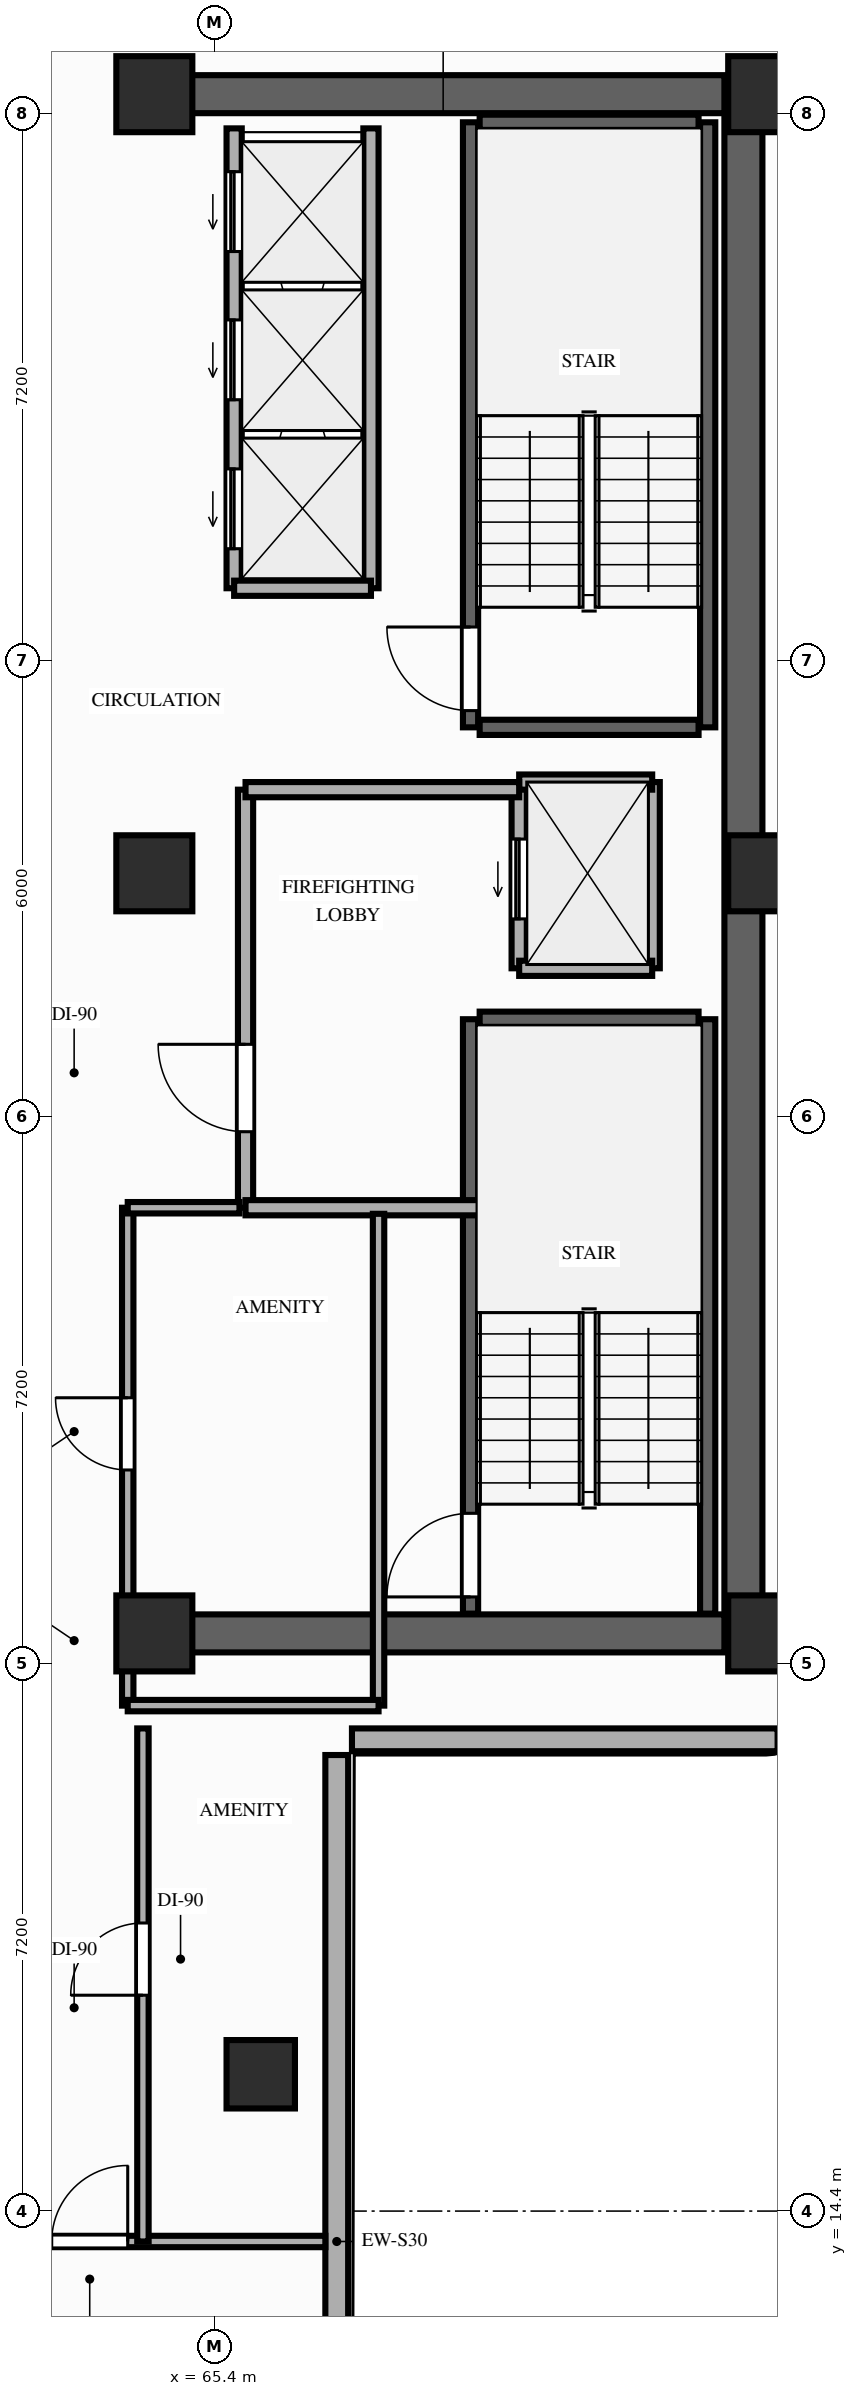
"""IFC4 building model, lengths in metres.
Left out: names, types, materials, properties, quantities, classifications, styles, units other than length and angle.
Written with IfcOpenShell. Run it as: python <this file> out.ifc"""

import sys

from ifc_helpers import new_model, si_unit, direction, frame, frame_2d, origin, origin_2d, place, context, subcontext, project, spatial, rectangle, extrude, element, fill, save


model = new_model("IFC4")
c1 = context("Model", 3, precision=1e-05, world=origin(), true_north=direction((0.0, 1.0)))
c2 = subcontext(c1, "Body", "Model", "MODEL_VIEW")
j1 = project(units=[si_unit("LENGTHUNIT", "METRE"), si_unit("PLANEANGLEUNIT", "RADIAN")], contexts=[c1])
p1 = place(None, origin())
s1 = spatial("IfcSite", under=j1, at=p1, CompositionType="ELEMENT")
p2 = place(p1, origin())
s2 = spatial("IfcBuilding", under=s1, at=p2, CompositionType="ELEMENT")
p3 = place(p2, frame((0.0, 0.0, 83.4)))
s3 = spatial("IfcBuildingStorey", under=s2, at=p3, CompositionType="ELEMENT", Elevation=83.4)
for number, where, z_axis, x_axis in (
    (1, (64.6, 22.0, 0.0), (0.0, 0.0, 1.0), (1.0, 0.0, 0.0)),
    (2, (72.65, 22.0, 0.0), (0.0, 0.0, 1.0), (1.0, 0.0, 0.0)),
    (3, (64.6, 32.0, 0.0), (0.0, 0.0, 1.0), (1.0, 0.0, 0.0)),
    (4, (72.65, 32.0, 0.0), (0.0, 0.0, 1.0), (1.0, 0.0, 0.0)),
    (5, (64.6, 42.25, 0.0), (0.0, 0.0, 1.0), (1.0, 0.0, 0.0)),
    (6, (72.65, 42.25, 0.0), (0.0, 0.0, 1.0), (1.0, 0.0, 0.0)),
):
    element("IfcColumn", number, at=place(p3, frame(where, z_axis=z_axis, x_axis=x_axis)), inside=s3, PredefinedType="COLUMN", context=c2, shape_type="SweptSolid", body=[
        extrude(rectangle(XDim=1.0, YDim=1.0, at=origin_2d()), origin(), (0.0, 0.0, 1.0), 3.2),
    ])
p4 = place(p3, frame((66.0, 16.2, 0.0), z_axis=(0.0, 0.0, 1.0), x_axis=(1.0, 0.0, 0.0)))
e7 = element("IfcColumn", 7, at=p4, inside=s3, PredefinedType="COLUMN", context=c2, shape_type="SweptSolid", body=[
    extrude(rectangle(XDim=0.9, YDim=0.9, at=origin_2d()), origin(), (0.0, 0.0, 1.0), 3.2),
])
p5 = place(p3, frame((67.0, 7.6, 0.0), z_axis=(0.0, 0.0, 1.0), x_axis=(0.0, 1.0, 0.0)))
e8 = element("IfcWall", 8, at=p5, inside=s3, PredefinedType="STANDARD", context=c2, shape_type="SweptSolid", body=[
    extrude(rectangle(XDim=12.8, YDim=0.3, at=frame_2d((6.4, 0.0))), origin(), (0.0, 0.0, 1.0), 3.02),
])
p6 = place(p3, frame((67.2, 20.6, 0.0), z_axis=(0.0, 0.0, 1.0), x_axis=(1.0, 0.0, 0.0)))
e9 = element("IfcWall", 9, at=p6, inside=s3, PredefinedType="STANDARD", context=c2, shape_type="SweptSolid", body=[
    extrude(rectangle(XDim=5.6, YDim=0.3, at=frame_2d((2.8, 0.0))), origin(), (0.0, 0.0, 1.0), 3.02),
])
p7 = place(p3, frame((72.35, 22.0, 0.0), z_axis=(0.0, 0.0, 1.0), x_axis=(0.0, 1.0, 0.0)))
e10 = element("IfcWall", 10, at=p7, inside=s3, PredefinedType="SHEAR", context=c2, shape_type="SweptSolid", body=[
    extrude(rectangle(XDim=20.25, YDim=0.5, at=frame_2d((10.125, 0.0))), origin(), (0.0, 0.0, 1.0), 3.02),
])
for number, where, z_axis, x_axis in (
    (11, (64.6, 42.25, 0.0), (0.0, 0.0, 1.0), (1.0, 0.0, 0.0)),
    (12, (64.6, 22.0, 0.0), (0.0, 0.0, 1.0), (1.0, 0.0, 0.0)),
):
    element("IfcWall", number, at=place(p3, frame(where, z_axis=z_axis, x_axis=x_axis)), inside=s3, PredefinedType="SHEAR", context=c2, shape_type="SweptSolid", body=[
        extrude(rectangle(XDim=7.5, YDim=0.5, at=frame_2d((3.75, 0.0))), origin(), (0.0, 0.0, 1.0), 3.02),
    ])
p8 = place(p3, frame((68.76, 22.26, 0.0), z_axis=(0.0, 0.0, 1.0), x_axis=(0.0, 1.0, 0.0)))
e13 = element("IfcWall", 13, at=p8, inside=s3, PredefinedType="SHEAR", context=c2, shape_type="SweptSolid", body=[
    extrude(rectangle(XDim=7.82, YDim=0.2, at=frame_2d((3.91, 0.0))), origin(), (0.0, 0.0, 1.0), 3.02),
])
p9 = place(p8, frame((0.22, 0.0, 0.0)))
e14 = element("IfcOpeningElement", 14, at=p9, cuts=e13, PredefinedType="OPENING", context=c2, shape_type="SweptSolid", body=[
    extrude(rectangle(XDim=1.1, YDim=2.15, at=frame_2d((0.55, 1.075))), frame((0.0, 0.11, 0.0), z_axis=(0.0, -1.0, 0.0), x_axis=(1.0, 0.0, 0.0)), (0.0, 0.0, 1.0), 0.22),
])
p10 = place(p3, frame((71.88, 22.26, 0.0), z_axis=(0.0, 0.0, 1.0), x_axis=(0.0, 1.0, 0.0)))
e15 = element("IfcWall", 15, at=p10, inside=s3, PredefinedType="SHEAR", context=c2, shape_type="SweptSolid", body=[
    extrude(rectangle(XDim=7.82, YDim=0.2, at=frame_2d((3.91, 0.0))), origin(), (0.0, 0.0, 1.0), 3.02),
])
p11 = place(p3, frame((68.88, 30.08, 0.0), z_axis=(0.0, 0.0, 1.0), x_axis=(1.0, 0.0, 0.0)))
e16 = element("IfcWall", 16, at=p11, inside=s3, PredefinedType="SHEAR", context=c2, shape_type="SweptSolid", body=[
    extrude(rectangle(XDim=2.88, YDim=0.2, at=frame_2d((1.44, 0.0))), origin(), (0.0, 0.0, 1.0), 3.02),
])
p12 = place(p3, frame((68.76, 33.92, 0.0), z_axis=(0.0, 0.0, 1.0), x_axis=(0.0, 1.0, 0.0)))
e17 = element("IfcWall", 17, at=p12, inside=s3, PredefinedType="SHEAR", context=c2, shape_type="SweptSolid", body=[
    extrude(rectangle(XDim=7.96, YDim=0.2, at=frame_2d((3.98, 0.0))), origin(), (0.0, 0.0, 1.0), 3.02),
])
p13 = place(p12, frame((0.22, 0.0, 0.0)))
e18 = element("IfcOpeningElement", 18, at=p13, cuts=e17, PredefinedType="OPENING", context=c2, shape_type="SweptSolid", body=[
    extrude(rectangle(XDim=1.1, YDim=2.15, at=frame_2d((0.55, 1.075))), frame((0.0, 0.11, 0.0), z_axis=(0.0, -1.0, 0.0), x_axis=(1.0, 0.0, 0.0)), (0.0, 0.0, 1.0), 0.22),
])
p14 = place(p3, frame((71.88, 33.92, 0.0), z_axis=(0.0, 0.0, 1.0), x_axis=(0.0, 1.0, 0.0)))
e19 = element("IfcWall", 19, at=p14, inside=s3, PredefinedType="SHEAR", context=c2, shape_type="SweptSolid", body=[
    extrude(rectangle(XDim=7.96, YDim=0.2, at=frame_2d((3.98, 0.0))), origin(), (0.0, 0.0, 1.0), 3.02),
])
for number, where, z_axis, x_axis in (
    (20, (68.88, 41.88, 0.0), (0.0, 0.0, 1.0), (1.0, 0.0, 0.0)),
    (21, (68.88, 33.92, 0.0), (0.0, 0.0, 1.0), (1.0, 0.0, 0.0)),
):
    element("IfcWall", number, at=place(p3, frame(where, z_axis=z_axis, x_axis=x_axis)), inside=s3, PredefinedType="SHEAR", context=c2, shape_type="SweptSolid", body=[
        extrude(rectangle(XDim=2.88, YDim=0.2, at=frame_2d((1.44, 0.0))), origin(), (0.0, 0.0, 1.0), 3.02),
    ])
p15 = place(p3, frame((65.65, 35.75, 0.0), z_axis=(0.0, 0.0, 1.0), x_axis=(0.0, 1.0, 0.0)))
e22 = element("IfcWall", 22, at=p15, inside=s3, PredefinedType="MOVABLE", context=c2, shape_type="SweptSolid", body=[
    extrude(rectangle(XDim=6.05, YDim=0.2, at=frame_2d((3.025, 0.0))), origin(), (0.0, 0.0, 1.0), 3.02),
])
p16 = place(p15, frame((0.52, 0.0, 0.0)))
e23 = element("IfcOpeningElement", 23, at=p16, cuts=e22, PredefinedType="OPENING", context=c2, shape_type="SweptSolid", body=[
    extrude(rectangle(XDim=1.05, YDim=2.15, at=frame_2d((0.525, 1.075))), frame((0.0, 0.11, 0.0), z_axis=(0.0, -1.0, 0.0), x_axis=(1.0, 0.0, 0.0)), (0.0, 0.0, 1.0), 0.22),
])
p17 = place(p15, frame((2.48, 0.0, 0.0)))
e24 = element("IfcOpeningElement", 24, at=p17, cuts=e22, PredefinedType="OPENING", context=c2, shape_type="SweptSolid", body=[
    extrude(rectangle(XDim=1.05, YDim=2.15, at=frame_2d((0.525, 1.075))), frame((0.0, 0.11, 0.0), z_axis=(0.0, -1.0, 0.0), x_axis=(1.0, 0.0, 0.0)), (0.0, 0.0, 1.0), 0.22),
])
p18 = place(p15, frame((4.43, 0.0, 0.0)))
e25 = element("IfcOpeningElement", 25, at=p18, cuts=e22, PredefinedType="OPENING", context=c2, shape_type="SweptSolid", body=[
    extrude(rectangle(XDim=1.05, YDim=2.15, at=frame_2d((0.525, 1.075))), frame((0.0, 0.11, 0.0), z_axis=(0.0, -1.0, 0.0), x_axis=(1.0, 0.0, 0.0)), (0.0, 0.0, 1.0), 0.22),
])
p19 = place(p3, frame((67.45, 35.75, 0.0), z_axis=(0.0, 0.0, 1.0), x_axis=(0.0, 1.0, 0.0)))
e26 = element("IfcWall", 26, at=p19, inside=s3, PredefinedType="MOVABLE", context=c2, shape_type="SweptSolid", body=[
    extrude(rectangle(XDim=6.05, YDim=0.2, at=frame_2d((3.025, 0.0))), origin(), (0.0, 0.0, 1.0), 3.02),
])
p20 = place(p3, frame((65.65, 35.75, 0.0), z_axis=(0.0, 0.0, 1.0), x_axis=(1.0, 0.0, 0.0)))
e27 = element("IfcWall", 27, at=p20, inside=s3, PredefinedType="MOVABLE", context=c2, shape_type="SweptSolid", body=[
    extrude(rectangle(XDim=1.8, YDim=0.2, at=frame_2d((0.9, 0.0))), origin(), (0.0, 0.0, 1.0), 3.02),
])
p21 = place(p3, frame((69.4, 30.75, 0.0), z_axis=(0.0, 0.0, 1.0), x_axis=(0.0, 1.0, 0.0)))
e28 = element("IfcWall", 28, at=p21, inside=s3, PredefinedType="MOVABLE", context=c2, shape_type="SweptSolid", body=[
    extrude(rectangle(XDim=2.45, YDim=0.2, at=frame_2d((1.225, 0.0))), origin(), (0.0, 0.0, 1.0), 3.02),
])
p22 = place(p21, frame((0.65, 0.0, 0.0)))
e29 = element("IfcOpeningElement", 29, at=p22, cuts=e28, PredefinedType="OPENING", context=c2, shape_type="SweptSolid", body=[
    extrude(rectangle(XDim=1.05, YDim=2.15, at=frame_2d((0.525, 1.075))), frame((0.0, 0.11, 0.0), z_axis=(0.0, -1.0, 0.0), x_axis=(1.0, 0.0, 0.0)), (0.0, 0.0, 1.0), 0.22),
])
p23 = place(p3, frame((71.15, 30.75, 0.0), z_axis=(0.0, 0.0, 1.0), x_axis=(0.0, 1.0, 0.0)))
e30 = element("IfcWall", 30, at=p23, inside=s3, PredefinedType="MOVABLE", context=c2, shape_type="SweptSolid", body=[
    extrude(rectangle(XDim=2.45, YDim=0.2, at=frame_2d((1.225, 0.0))), origin(), (0.0, 0.0, 1.0), 3.02),
])
for number, where, z_axis, x_axis in (
    (31, (69.4, 33.2, 0.0), (0.0, 0.0, 1.0), (1.0, 0.0, 0.0)),
    (32, (69.4, 30.75, 0.0), (0.0, 0.0, 1.0), (1.0, 0.0, 0.0)),
):
    element("IfcWall", number, at=place(p3, frame(where, z_axis=z_axis, x_axis=x_axis)), inside=s3, PredefinedType="MOVABLE", context=c2, shape_type="SweptSolid", body=[
        extrude(rectangle(XDim=1.75, YDim=0.2, at=frame_2d((0.875, 0.0))), origin(), (0.0, 0.0, 1.0), 3.02),
    ])
p24 = place(p3, frame((65.8, 27.6, 0.0), z_axis=(0.0, 0.0, 1.0), x_axis=(0.0, 1.0, 0.0)))
e33 = element("IfcWall", 33, at=p24, inside=s3, PredefinedType="PARTITIONING", context=c2, shape_type="SweptSolid", body=[
    extrude(rectangle(XDim=5.5, YDim=0.2, at=frame_2d((2.75, 0.0))), origin(), (0.0, 0.0, 1.0), 3.02),
])
p25 = place(p24, frame((1.0, 0.0, 0.0)))
e34 = element("IfcOpeningElement", 34, at=p25, cuts=e33, PredefinedType="OPENING", context=c2, shape_type="SweptSolid", body=[
    extrude(rectangle(XDim=1.15, YDim=2.15, at=frame_2d((0.575, 1.075))), frame((0.0, 0.11, 0.0), z_axis=(0.0, -1.0, 0.0), x_axis=(1.0, 0.0, 0.0)), (0.0, 0.0, 1.0), 0.22),
])
p26 = place(p3, frame((65.8, 33.1, 0.0), z_axis=(0.0, 0.0, 1.0), x_axis=(1.0, 0.0, 0.0)))
e35 = element("IfcWall", 35, at=p26, inside=s3, PredefinedType="PARTITIONING", context=c2, shape_type="SweptSolid", body=[
    extrude(rectangle(XDim=3.6, YDim=0.2, at=frame_2d((1.8, 0.0))), origin(), (0.0, 0.0, 1.0), 3.02),
])
p27 = place(p3, frame((65.8, 27.6, 0.0), z_axis=(0.0, 0.0, 1.0), x_axis=(1.0, 0.0, 0.0)))
e36 = element("IfcWall", 36, at=p27, inside=s3, PredefinedType="PARTITIONING", context=c2, shape_type="SweptSolid", body=[
    extrude(rectangle(XDim=3.4, YDim=0.2, at=frame_2d((1.7, 0.0))), origin(), (0.0, 0.0, 1.0), 3.02),
])
p28 = place(p3, frame((64.25, 21.05, 0.0), z_axis=(0.0, 0.0, 1.0), x_axis=(0.0, 1.0, 0.0)))
e37 = element("IfcWall", 37, at=p28, inside=s3, PredefinedType="PARTITIONING", context=c2, shape_type="SweptSolid", body=[
    extrude(rectangle(XDim=6.55, YDim=0.15, at=frame_2d((3.275, 0.0))), origin(), (0.0, 0.0, 1.0), 2.57),
])
p29 = place(p28, frame((3.1, 0.0, 0.0)))
e38 = element("IfcOpeningElement", 38, at=p29, cuts=e37, PredefinedType="OPENING", context=c2, shape_type="SweptSolid", body=[
    extrude(rectangle(XDim=0.95, YDim=2.15, at=frame_2d((0.475, 1.075))), frame((0.0, 0.085, 0.0), z_axis=(0.0, -1.0, 0.0), x_axis=(1.0, 0.0, 0.0)), (0.0, 0.0, 1.0), 0.17),
])
p30 = place(p3, frame((67.55, 21.05, 0.0), z_axis=(0.0, 0.0, 1.0), x_axis=(0.0, 1.0, 0.0)))
e39 = element("IfcWall", 39, at=p30, inside=s3, PredefinedType="PARTITIONING", context=c2, shape_type="SweptSolid", body=[
    extrude(rectangle(XDim=6.47, YDim=0.15, at=frame_2d((3.235, 0.0))), origin(), (0.0, 0.0, 1.0), 2.6),
])
p31 = place(p3, frame((64.25, 21.05, 0.0), z_axis=(0.0, 0.0, 1.0), x_axis=(1.0, 0.0, 0.0)))
e40 = element("IfcWall", 40, at=p31, inside=s3, PredefinedType="PARTITIONING", context=c2, shape_type="SweptSolid", body=[
    extrude(rectangle(XDim=3.3, YDim=0.15, at=frame_2d((1.65, 0.0))), origin(), (0.0, 0.0, 1.0), 2.57),
])
p32 = place(p3, frame((64.25, 27.6, 0.0), z_axis=(0.0, 0.0, 1.0), x_axis=(1.0, 0.0, 0.0)))
e41 = element("IfcWall", 41, at=p32, inside=s3, PredefinedType="PARTITIONING", context=c2, shape_type="SweptSolid", body=[
    extrude(rectangle(XDim=1.47, YDim=0.15, at=frame_2d((0.735, 0.0))), origin(), (0.0, 0.0, 1.0), 2.6),
])
p33 = place(p3, frame((55.55, 14.0, 0.0), z_axis=(0.0, 0.0, 1.0), x_axis=(1.0, 0.0, 0.0)))
e42 = element("IfcWall", 42, at=p33, inside=s3, PredefinedType="PARTITIONING", context=c2, shape_type="SweptSolid", body=[
    extrude(rectangle(XDim=11.3, YDim=0.15, at=frame_2d((5.65, 0.0))), origin(), (0.0, 0.0, 1.0), 2.57),
])
p34 = place(p33, frame((7.7, 0.0, 0.0)))
e43 = element("IfcOpeningElement", 43, at=p34, cuts=e42, PredefinedType="OPENING", context=c2, shape_type="SweptSolid", body=[
    extrude(rectangle(XDim=1.0, YDim=2.15, at=frame_2d((0.5, 1.075))), frame((0.0, 0.085, 0.0), z_axis=(0.0, -1.0, 0.0), x_axis=(1.0, 0.0, 0.0)), (0.0, 0.0, 1.0), 0.17),
])
p35 = place(p3, frame((64.45, 14.0, 0.0), z_axis=(0.0, 0.0, 1.0), x_axis=(0.0, 1.0, 0.0)))
e44 = element("IfcWall", 44, at=p35, inside=s3, PredefinedType="PARTITIONING", context=c2, shape_type="SweptSolid", body=[
    extrude(rectangle(XDim=6.75, YDim=0.15, at=frame_2d((3.375, 0.0))), origin(), (0.0, 0.0, 1.0), 2.57),
])
p36 = place(p35, frame((3.24, 0.0, 0.0)))
e45 = element("IfcOpeningElement", 45, at=p36, cuts=e44, PredefinedType="OPENING", context=c2, shape_type="SweptSolid", body=[
    extrude(rectangle(XDim=0.95, YDim=2.15, at=frame_2d((0.475, 1.075))), frame((0.0, 0.085, 0.0), z_axis=(0.0, -1.0, 0.0), x_axis=(1.0, 0.0, 0.0)), (0.0, 0.0, 1.0), 0.17),
])
p37 = place(p9, origin())
e46 = element("IfcDoor", 46, at=p37, inside=s3, OperationType="SINGLE_SWING_LEFT", PredefinedType="DOOR", context=c2, shape_type="SweptSolid", body=[
    extrude(rectangle(XDim=1.1, YDim=2.15, at=frame_2d((0.55, 1.075))), frame((0.0, 0.025, 0.0), z_axis=(0.0, -1.0, 0.0), x_axis=(1.0, 0.0, 0.0)), (0.0, 0.0, 1.0), 0.05),
])
fill(e14, e46)
p38 = place(p13, origin())
e47 = element("IfcDoor", 47, at=p38, inside=s3, OperationType="SINGLE_SWING_RIGHT", PredefinedType="DOOR", context=c2, shape_type="SweptSolid", body=[
    extrude(rectangle(XDim=1.1, YDim=2.15, at=frame_2d((0.55, 1.075))), frame((0.0, 0.025, 0.0), z_axis=(0.0, -1.0, 0.0), x_axis=(1.0, 0.0, 0.0)), (0.0, 0.0, 1.0), 0.05),
])
fill(e18, e47)
p39 = place(p16, origin())
e48 = element("IfcDoor", 48, at=p39, inside=s3, OperationType="SLIDING_TO_LEFT", PredefinedType="DOOR", context=c2, shape_type="SweptSolid", body=[
    extrude(rectangle(XDim=1.05, YDim=2.15, at=frame_2d((0.525, 1.075))), frame((0.0, 0.025, 0.0), z_axis=(0.0, -1.0, 0.0), x_axis=(1.0, 0.0, 0.0)), (0.0, 0.0, 1.0), 0.05),
])
fill(e23, e48)
p40 = place(p17, origin())
e49 = element("IfcDoor", 49, at=p40, inside=s3, OperationType="SLIDING_TO_LEFT", PredefinedType="DOOR", context=c2, shape_type="SweptSolid", body=[
    extrude(rectangle(XDim=1.05, YDim=2.15, at=frame_2d((0.525, 1.075))), frame((0.0, 0.025, 0.0), z_axis=(0.0, -1.0, 0.0), x_axis=(1.0, 0.0, 0.0)), (0.0, 0.0, 1.0), 0.05),
])
fill(e24, e49)
p41 = place(p18, origin())
e50 = element("IfcDoor", 50, at=p41, inside=s3, OperationType="SLIDING_TO_LEFT", PredefinedType="DOOR", context=c2, shape_type="SweptSolid", body=[
    extrude(rectangle(XDim=1.05, YDim=2.15, at=frame_2d((0.525, 1.075))), frame((0.0, 0.025, 0.0), z_axis=(0.0, -1.0, 0.0), x_axis=(1.0, 0.0, 0.0)), (0.0, 0.0, 1.0), 0.05),
])
fill(e25, e50)
p42 = place(p22, origin())
e51 = element("IfcDoor", 51, at=p42, inside=s3, OperationType="SLIDING_TO_LEFT", PredefinedType="DOOR", context=c2, shape_type="SweptSolid", body=[
    extrude(rectangle(XDim=1.05, YDim=2.15, at=frame_2d((0.525, 1.075))), frame((0.0, 0.025, 0.0), z_axis=(0.0, -1.0, 0.0), x_axis=(1.0, 0.0, 0.0)), (0.0, 0.0, 1.0), 0.05),
])
fill(e29, e51)
p43 = place(p25, origin())
e52 = element("IfcDoor", 52, at=p43, inside=s3, OperationType="SINGLE_SWING_RIGHT", PredefinedType="DOOR", context=c2, shape_type="SweptSolid", body=[
    extrude(rectangle(XDim=1.15, YDim=2.15, at=frame_2d((0.575, 1.075))), frame((0.0, 0.025, 0.0), z_axis=(0.0, -1.0, 0.0), x_axis=(1.0, 0.0, 0.0)), (0.0, 0.0, 1.0), 0.05),
])
fill(e34, e52)
p44 = place(p29, origin())
e53 = element("IfcDoor", 53, at=p44, inside=s3, OperationType="SINGLE_SWING_RIGHT", PredefinedType="DOOR", context=c2, shape_type="SweptSolid", body=[
    extrude(rectangle(XDim=0.95, YDim=2.15, at=frame_2d((0.475, 1.075))), frame((0.0, 0.025, 0.0), z_axis=(0.0, -1.0, 0.0), x_axis=(1.0, 0.0, 0.0)), (0.0, 0.0, 1.0), 0.05),
])
fill(e38, e53)
p45 = place(p36, origin())
e54 = element("IfcDoor", 54, at=p45, inside=s3, OperationType="SINGLE_SWING_LEFT", PredefinedType="DOOR", context=c2, shape_type="SweptSolid", body=[
    extrude(rectangle(XDim=0.95, YDim=2.15, at=frame_2d((0.475, 1.075))), frame((0.0, 0.025, 0.0), z_axis=(0.0, -1.0, 0.0), x_axis=(1.0, 0.0, 0.0)), (0.0, 0.0, 1.0), 0.05),
])
fill(e45, e54)
p46 = place(p34, origin())
e55 = element("IfcDoor", 55, at=p46, inside=s3, OperationType="SINGLE_SWING_RIGHT", PredefinedType="DOOR", context=c2, shape_type="SweptSolid", body=[
    extrude(rectangle(XDim=1.0, YDim=2.15, at=frame_2d((0.5, 1.075))), frame((0.0, 0.025, 0.0), z_axis=(0.0, -1.0, 0.0), x_axis=(1.0, 0.0, 0.0)), (0.0, 0.0, 1.0), 0.05),
])
fill(e43, e55)
save(model, sys.argv[1])
